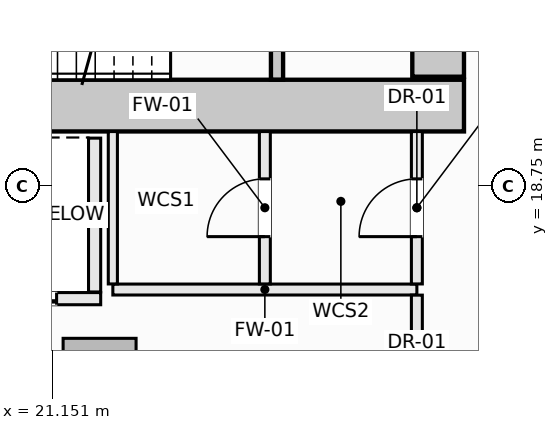
"""IFC4 building model, lengths in metres.
Left out: names, types, materials, properties, quantities, classifications, styles, units other than length and angle.
Written with IfcOpenShell. Run it as: python <this file> out.ifc"""

import sys

from ifc_helpers import new_model, si_unit, direction, frame, frame_2d, origin, origin_2d, place, context, subcontext, project, spatial, rectangle, extrude, element, fill, save


model = new_model("IFC4")
c1 = context("Model", 3, precision=1e-05, world=origin(), true_north=direction((0.0, 1.0)))
c2 = subcontext(c1, "Body", "Model", "MODEL_VIEW")
j1 = project(units=[si_unit("LENGTHUNIT", "METRE"), si_unit("PLANEANGLEUNIT", "RADIAN")], contexts=[c1])
p1 = place(None, origin())
s1 = spatial("IfcSite", under=j1, at=p1, CompositionType="ELEMENT")
p2 = place(p1, origin())
s2 = spatial("IfcBuilding", under=s1, at=p2, CompositionType="ELEMENT")
p3 = place(p2, frame((0.0, 0.0, 65.0)))
s3 = spatial("IfcBuildingStorey", under=s2, at=p3, CompositionType="ELEMENT", Elevation=65.0)
p4 = place(p3, frame((14.075, 20.075, -0.28), z_axis=(0.0, 0.0, 1.0), x_axis=(1.0, 0.0, 0.0)))
e1 = element("IfcWall", 1, at=p4, inside=s3, PredefinedType="SHEAR", context=c2, shape_type="SweptSolid", body=[
    extrude(rectangle(XDim=13.85, YDim=0.85, at=frame_2d((6.925, 0.0))), origin(), (0.0, 0.0, 1.0), 3.85),
])
p5 = place(p3, frame((27.5, 20.55, -0.28), z_axis=(0.0, 0.0, 1.0), x_axis=(0.0, 1.0, 0.0)))
e2 = element("IfcWall", 2, at=p5, inside=s3, PredefinedType="SHEAR", context=c2, shape_type="SweptSolid", body=[
    extrude(rectangle(XDim=1.5, YDim=0.85, at=frame_2d((0.75, 0.0))), origin(), (0.0, 0.0, 1.0), 3.85),
])
p6 = place(p3, frame((21.932, 15.648, -0.28), z_axis=(0.0, 0.0, 1.0), x_axis=(1.0, 0.0, 0.0)))
e3 = element("IfcColumn", 3, at=p6, inside=s3, PredefinedType="COLUMN", context=c2, shape_type="SweptSolid", body=[
    extrude(rectangle(XDim=1.2, YDim=1.2, at=origin_2d()), origin(), (0.0, 0.0, 1.0), 3.85),
])
p7 = place(p3, frame((24.85, 20.502, -0.28), z_axis=(0.0, 0.0, 1.0), x_axis=(0.0, 1.0, 0.0)))
e4 = element("IfcWall", 4, at=p7, inside=s3, PredefinedType="SHEAR", context=c2, shape_type="SweptSolid", body=[
    extrude(rectangle(XDim=3.038, YDim=0.2, at=frame_2d((1.519, 0.0))), origin(), (0.0, 0.0, 1.0), 3.85),
])
p8 = place(p7, frame((0.969, 0.0, 0.28)))
e5 = element("IfcOpeningElement", 5, at=p8, cuts=e4, PredefinedType="OPENING", context=c2, shape_type="SweptSolid", body=[
    extrude(rectangle(XDim=1.1, YDim=2.15, at=frame_2d((0.55, 1.075))), frame((0.0, 0.11, 0.0), z_axis=(0.0, -1.0, 0.0), x_axis=(1.0, 0.0, 0.0)), (0.0, 0.0, 1.0), 0.22),
])
p9 = place(p3, frame((19.4, 16.9, 0.0), z_axis=(0.0, 0.0, 1.0), x_axis=(1.0, 0.0, 0.0)))
e6 = element("IfcWall", 6, at=p9, inside=s3, PredefinedType="SOLIDWALL", context=c2, shape_type="SweptSolid", body=[
    extrude(rectangle(XDim=2.55, YDim=0.2, at=frame_2d((1.275, 0.0))), origin(), (0.0, 0.0, 1.0), 3.57),
])
p10 = place(p9, frame((0.725, 0.0, 0.0)))
e7 = element("IfcOpeningElement", 7, at=p10, cuts=e6, PredefinedType="OPENING", context=c2, shape_type="SweptSolid", body=[
    extrude(rectangle(XDim=1.1, YDim=2.2, at=frame_2d((0.55, 1.1))), frame((0.0, 0.11, 0.0), z_axis=(0.0, -1.0, 0.0), x_axis=(1.0, 0.0, 0.0)), (0.0, 0.0, 1.0), 0.22),
])
p11 = place(p3, frame((21.85, 17.01, 0.0), z_axis=(0.0, 0.0, 1.0), x_axis=(0.0, 1.0, 0.0)))
e8 = element("IfcWall", 8, at=p11, inside=s3, PredefinedType="SOLIDWALL", context=c2, shape_type="SweptSolid", body=[
    extrude(rectangle(XDim=2.53, YDim=0.2, at=frame_2d((1.265, 0.0))), origin(), (0.0, 0.0, 1.0), 3.57),
])
p12 = place(p3, frame((22.15, 17.05, 0.0), z_axis=(0.0, 0.0, 1.0), x_axis=(1.0, 0.0, 0.0)))
e9 = element("IfcWall", 9, at=p12, inside=s3, PredefinedType="SOLIDWALL", context=c2, shape_type="SweptSolid", body=[
    extrude(rectangle(XDim=5.0, YDim=0.18, at=frame_2d((2.5, 0.0))), origin(), (0.0, 0.0, 1.0), 3.57),
])
p13 = place(p3, frame((22.15, 17.142, 0.0), z_axis=(0.0, 0.0, 1.0), x_axis=(0.0, 1.0, 0.0)))
e10 = element("IfcWall", 10, at=p13, inside=s3, PredefinedType="PARTITIONING", context=c2, shape_type="SweptSolid", body=[
    extrude(rectangle(XDim=2.506, YDim=0.15, at=frame_2d((1.253, 0.0))), origin(), (0.0, 0.0, 1.0), 3.57),
])
p14 = place(p3, frame((24.65, 17.142, 0.0), z_axis=(0.0, 0.0, 1.0), x_axis=(0.0, 1.0, 0.0)))
e11 = element("IfcWall", 11, at=p14, inside=s3, PredefinedType="SOLIDWALL", context=c2, shape_type="SweptSolid", body=[
    extrude(rectangle(XDim=2.506, YDim=0.18, at=frame_2d((1.253, 0.0))), origin(), (0.0, 0.0, 1.0), 3.57),
])
p15 = place(p14, frame((0.778, 0.0, 0.0)))
e12 = element("IfcOpeningElement", 12, at=p15, cuts=e11, PredefinedType="OPENING", context=c2, shape_type="SweptSolid", body=[
    extrude(rectangle(XDim=0.95, YDim=2.1, at=frame_2d((0.475, 1.05))), frame((0.0, 0.1, 0.0), z_axis=(0.0, -1.0, 0.0), x_axis=(1.0, 0.0, 0.0)), (0.0, 0.0, 1.0), 0.2),
])
p16 = place(p3, frame((27.15, 11.75, 0.0), z_axis=(0.0, 0.0, 1.0), x_axis=(0.0, 1.0, 0.0)))
e13 = element("IfcWall", 13, at=p16, inside=s3, PredefinedType="SOLIDWALL", context=c2, shape_type="SweptSolid", body=[
    extrude(rectangle(XDim=5.208, YDim=0.18, at=frame_2d((2.604, 0.0))), origin(), (0.0, 0.0, 1.0), 3.57),
])
p17 = place(p16, frame((2.129, 0.0, 0.0)))
e14 = element("IfcOpeningElement", 14, at=p17, cuts=e13, PredefinedType="OPENING", context=c2, shape_type="SweptSolid", body=[
    extrude(rectangle(XDim=0.95, YDim=2.1, at=frame_2d((0.475, 1.05))), frame((0.0, 0.1, 0.0), z_axis=(0.0, -1.0, 0.0), x_axis=(1.0, 0.0, 0.0)), (0.0, 0.0, 1.0), 0.2),
])
p18 = place(p3, frame((27.15, 17.142, 0.0), z_axis=(0.0, 0.0, 1.0), x_axis=(0.0, 1.0, 0.0)))
e15 = element("IfcWall", 15, at=p18, inside=s3, PredefinedType="SOLIDWALL", context=c2, shape_type="SweptSolid", body=[
    extrude(rectangle(XDim=2.506, YDim=0.18, at=frame_2d((1.253, 0.0))), origin(), (0.0, 0.0, 1.0), 3.57),
])
p19 = place(p18, frame((0.778, 0.0, 0.0)))
e16 = element("IfcOpeningElement", 16, at=p19, cuts=e15, PredefinedType="OPENING", context=c2, shape_type="SweptSolid", body=[
    extrude(rectangle(XDim=0.95, YDim=2.1, at=frame_2d((0.475, 1.05))), frame((0.0, 0.1, 0.0), z_axis=(0.0, -1.0, 0.0), x_axis=(1.0, 0.0, 0.0)), (0.0, 0.0, 1.0), 0.2),
])
p20 = place(p10, origin())
e17 = element("IfcDoor", 17, at=p20, inside=s3, OperationType="SLIDING_TO_LEFT", PredefinedType="DOOR", context=c2, shape_type="SweptSolid", body=[
    extrude(rectangle(XDim=1.1, YDim=2.2, at=frame_2d((0.55, 1.1))), frame((0.0, 0.025, 0.0), z_axis=(0.0, -1.0, 0.0), x_axis=(1.0, 0.0, 0.0)), (0.0, 0.0, 1.0), 0.05),
])
fill(e7, e17)
p21 = place(p19, origin())
e18 = element("IfcDoor", 18, at=p21, inside=s3, OperationType="SINGLE_SWING_LEFT", PredefinedType="DOOR", context=c2, shape_type="SweptSolid", body=[
    extrude(rectangle(XDim=0.95, YDim=2.1, at=frame_2d((0.475, 1.05))), frame((0.0, 0.025, 0.0), z_axis=(0.0, -1.0, 0.0), x_axis=(1.0, 0.0, 0.0)), (0.0, 0.0, 1.0), 0.05),
])
fill(e16, e18)
p22 = place(p15, origin())
e19 = element("IfcDoor", 19, at=p22, inside=s3, OperationType="SINGLE_SWING_LEFT", PredefinedType="DOOR", context=c2, shape_type="SweptSolid", body=[
    extrude(rectangle(XDim=0.95, YDim=2.1, at=frame_2d((0.475, 1.05))), frame((0.0, 0.025, 0.0), z_axis=(0.0, -1.0, 0.0), x_axis=(1.0, 0.0, 0.0)), (0.0, 0.0, 1.0), 0.05),
])
fill(e12, e19)
save(model, sys.argv[1])
